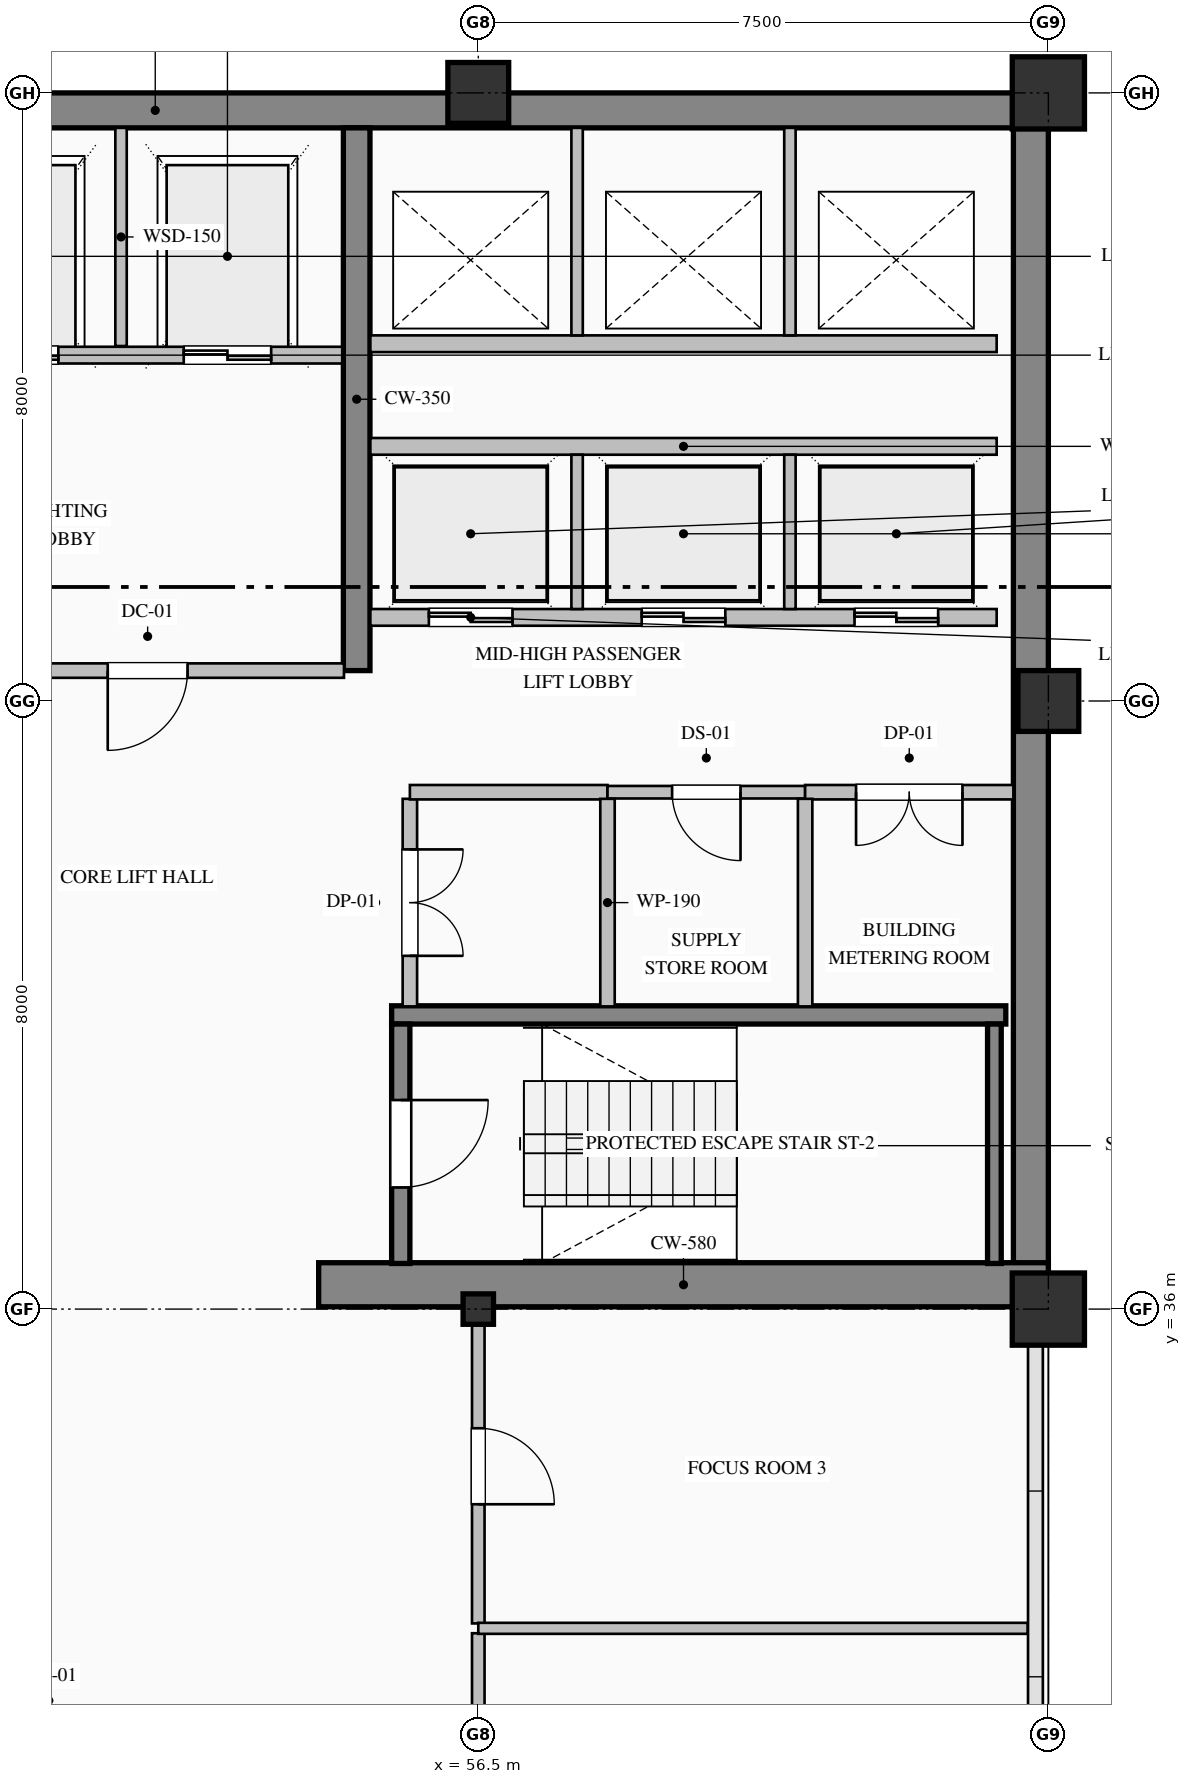
"""IFC4 building model, lengths in metres.
Left out: names, types, materials, properties, quantities, classifications, styles, units other than length and angle.
Written with IfcOpenShell. Run it as: python <this file> out.ifc"""

import sys

from ifc_helpers import new_model, si_unit, direction, frame, frame_2d, origin, origin_2d, place, context, subcontext, project, spatial, rectangle, hollow_rectangle, i_section, extrude, element, fill, save


model = new_model("IFC4")
c1 = context("Model", 3, precision=1e-05, world=origin(), true_north=direction((0.0, 1.0)))
c2 = subcontext(c1, "Body", "Model", "MODEL_VIEW")
j1 = project(units=[si_unit("LENGTHUNIT", "METRE"), si_unit("PLANEANGLEUNIT", "RADIAN")], contexts=[c1])
p1 = place(None, origin())
s1 = spatial("IfcSite", under=j1, at=p1, CompositionType="ELEMENT")
p2 = place(p1, origin())
s2 = spatial("IfcBuilding", under=s1, at=p2, CompositionType="ELEMENT")
p3 = place(p2, frame((0.0, 0.0, 209.8)))
s3 = spatial("IfcBuildingStorey", under=s2, at=p3, CompositionType="ELEMENT", Elevation=209.8)
p4 = place(p3, frame((40.5, 51.77, 0.0), z_axis=(0.0, 0.0, 1.0), x_axis=(1.0, 0.0, 0.0)))
e1 = element("IfcWall", 1, at=p4, inside=s3, PredefinedType="SHEAR", context=c2, shape_type="SweptSolid", body=[
    extrude(rectangle(XDim=23.5, YDim=0.46, at=frame_2d((11.75, 0.0))), origin(), (0.0, 0.0, 1.0), 3.775),
])
p5 = place(p3, frame((63.77, 36.32, 0.0), z_axis=(0.0, 0.0, 1.0), x_axis=(0.0, 1.0, 0.0)))
e2 = element("IfcWall", 2, at=p5, inside=s3, PredefinedType="SHEAR", context=c2, shape_type="SweptSolid", body=[
    extrude(rectangle(XDim=15.22, YDim=0.46, at=frame_2d((7.61, 0.0))), origin(), (0.0, 0.0, 1.0), 3.775),
])
p6 = place(p3, frame((54.4, 36.32, 0.0), z_axis=(0.0, 0.0, 1.0), x_axis=(1.0, 0.0, 0.0)))
e3 = element("IfcWall", 3, at=p6, inside=s3, PredefinedType="SHEAR", context=c2, shape_type="SweptSolid", body=[
    extrude(rectangle(XDim=9.6, YDim=0.58, at=frame_2d((4.8, 0.0))), origin(), (0.0, 0.0, 1.0), 4.0),
])
p7 = place(p3, frame((54.9, 44.4, 0.0), z_axis=(0.0, 0.0, 1.0), x_axis=(0.0, 1.0, 0.0)))
e4 = element("IfcWall", 4, at=p7, inside=s3, PredefinedType="SHEAR", context=c2, shape_type="SweptSolid", body=[
    extrude(rectangle(XDim=7.14, YDim=0.35, at=frame_2d((3.57, 0.0))), origin(), (0.0, 0.0, 1.0), 3.775),
])
p8 = place(p3, frame((56.5, 36.0, 0.0), z_axis=(0.0, 0.0, 1.0), x_axis=(1.0, 0.0, 0.0)))
e5 = element("IfcColumn", 5, at=p8, inside=s3, PredefinedType="COLUMN", context=c2, shape_type="SweptSolid", body=[
    extrude(i_section(OverallWidth=0.4, OverallDepth=0.4, WebThickness=0.013, FlangeThickness=0.021, FilletRadius=0.022, at=origin_2d()), origin(), (0.0, 0.0, 1.0), 4.0),
])
p9 = place(p3, frame((56.5, 52.0, 0.0), z_axis=(0.0, 0.0, 1.0), x_axis=(1.0, 0.0, 0.0)))
e6 = element("IfcColumn", 6, at=p9, inside=s3, PredefinedType="COLUMN", context=c2, shape_type="SweptSolid", body=[
    extrude(hollow_rectangle(XDim=0.8, YDim=0.8, WallThickness=0.032, at=origin_2d()), origin(), (0.0, 0.0, 1.0), 4.0),
])
p10 = place(p3, frame((64.0, 36.0, 0.0), z_axis=(0.0, 0.0, 1.0), x_axis=(1.0, 0.0, 0.0)))
e7 = element("IfcColumn", 7, at=p10, inside=s3, PredefinedType="COLUMN", context=c2, shape_type="SweptSolid", body=[
    extrude(hollow_rectangle(XDim=0.95, YDim=0.95, WallThickness=0.036, at=origin_2d()), origin(), (0.0, 0.0, 1.0), 4.0),
])
p11 = place(p3, frame((64.0, 44.0, 0.0), z_axis=(0.0, 0.0, 1.0), x_axis=(1.0, 0.0, 0.0)))
e8 = element("IfcColumn", 8, at=p11, inside=s3, PredefinedType="COLUMN", context=c2, shape_type="SweptSolid", body=[
    extrude(hollow_rectangle(XDim=0.8, YDim=0.8, WallThickness=0.032, at=origin_2d()), origin(), (0.0, 0.0, 1.0), 4.0),
])
p12 = place(p3, frame((64.0, 52.0, 0.0), z_axis=(0.0, 0.0, 1.0), x_axis=(1.0, 0.0, 0.0)))
e9 = element("IfcColumn", 9, at=p12, inside=s3, PredefinedType="COLUMN", context=c2, shape_type="SweptSolid", body=[
    extrude(hollow_rectangle(XDim=0.95, YDim=0.95, WallThickness=0.036, at=origin_2d()), origin(), (0.0, 0.0, 1.0), 4.0),
])
p13 = place(p3, frame((55.36, 39.87, 0.0), z_axis=(0.0, 0.0, 1.0), x_axis=(1.0, 0.0, 0.0)))
e10 = element("IfcWall", 10, at=p13, inside=s3, PredefinedType="SOLIDWALL", context=c2, shape_type="SweptSolid", body=[
    extrude(rectangle(XDim=8.08, YDim=0.24, at=frame_2d((4.04, 0.0))), origin(), (0.0, 0.0, 1.0), 4.0),
])
p14 = place(p3, frame((55.48, 39.75, 0.0), z_axis=(0.0, 0.0, 1.0), x_axis=(0.0, -1.0, 0.0)))
e11 = element("IfcWall", 11, at=p14, inside=s3, PredefinedType="SOLIDWALL", context=c2, shape_type="SweptSolid", body=[
    extrude(rectangle(XDim=3.15, YDim=0.24, at=frame_2d((1.575, 0.0))), origin(), (0.0, 0.0, 1.0), 4.0),
])
p15 = place(p14, frame((1.0, 0.0, 0.0)))
e12 = element("IfcOpeningElement", 12, at=p15, cuts=e11, PredefinedType="OPENING", context=c2, shape_type="SweptSolid", body=[
    extrude(rectangle(XDim=1.15, YDim=2.2, at=frame_2d((0.575, 1.1))), frame((0.0, 0.13, 0.0), z_axis=(0.0, -1.0, 0.0), x_axis=(1.0, 0.0, 0.0)), (0.0, 0.0, 1.0), 0.26),
])
p16 = place(p3, frame((63.29, 36.6, 0.0), z_axis=(0.0, 0.0, 1.0), x_axis=(0.0, 1.0, 0.0)))
e13 = element("IfcWall", 13, at=p16, inside=s3, PredefinedType="SOLIDWALL", context=c2, shape_type="SweptSolid", body=[
    extrude(rectangle(XDim=3.15, YDim=0.18, at=frame_2d((1.575, 0.0))), origin(), (0.0, 0.0, 1.0), 4.0),
])
p17 = place(p3, frame((54.71, 48.55, 0.0), z_axis=(0.0, 0.0, 1.0), x_axis=(-1.0, 0.0, 0.0)))
e14 = element("IfcWall", 14, at=p17, inside=s3, PredefinedType="PARTITIONING", context=c2, shape_type="SweptSolid", body=[
    extrude(rectangle(XDim=5.12, YDim=0.22, at=frame_2d((2.56, 0.0))), origin(), (0.0, 0.0, 1.0), 3.775),
])
p18 = place(p17, frame((3.735, 0.0, 0.0)))
e15 = element("IfcOpeningElement", 15, at=p18, cuts=e14, PredefinedType="OPENING", context=c2, shape_type="SweptSolid", body=[
    extrude(rectangle(XDim=1.15, YDim=2.2, at=frame_2d((0.575, 1.1))), frame((0.0, 0.12, 0.0), z_axis=(0.0, -1.0, 0.0), x_axis=(1.0, 0.0, 0.0)), (0.0, 0.0, 1.0), 0.24),
])
p19 = place(p17, frame((0.935, 0.0, 0.0)))
e16 = element("IfcOpeningElement", 16, at=p19, cuts=e14, PredefinedType="OPENING", context=c2, shape_type="SweptSolid", body=[
    extrude(rectangle(XDim=1.15, YDim=2.2, at=frame_2d((0.575, 1.1))), frame((0.0, 0.12, 0.0), z_axis=(0.0, -1.0, 0.0), x_axis=(1.0, 0.0, 0.0)), (0.0, 0.0, 1.0), 0.24),
])
p20 = place(p3, frame((51.8, 48.67, 0.0), z_axis=(0.0, 0.0, 1.0), x_axis=(0.0, 1.0, 0.0)))
e17 = element("IfcWall", 17, at=p20, inside=s3, PredefinedType="PARTITIONING", context=c2, shape_type="SweptSolid", body=[
    extrude(rectangle(XDim=2.87, YDim=0.15, at=frame_2d((1.435, 0.0))), origin(), (0.0, 0.0, 1.0), 3.775),
])
p21 = place(p3, frame((63.32, 45.1, 0.0), z_axis=(0.0, 0.0, 1.0), x_axis=(-1.0, 0.0, 0.0)))
e18 = element("IfcWall", 18, at=p21, inside=s3, PredefinedType="PARTITIONING", context=c2, shape_type="SweptSolid", body=[
    extrude(rectangle(XDim=8.24, YDim=0.22, at=frame_2d((4.12, 0.0))), origin(), (0.0, 0.0, 1.0), 3.775),
])
p22 = place(p21, frame((6.37, 0.0, 0.0)))
e19 = element("IfcOpeningElement", 19, at=p22, cuts=e18, PredefinedType="OPENING", context=c2, shape_type="SweptSolid", body=[
    extrude(rectangle(XDim=1.1, YDim=2.2, at=frame_2d((0.55, 1.1))), frame((0.0, 0.12, 0.0), z_axis=(0.0, -1.0, 0.0), x_axis=(1.0, 0.0, 0.0)), (0.0, 0.0, 1.0), 0.24),
])
p23 = place(p21, frame((3.57, 0.0, 0.0)))
e20 = element("IfcOpeningElement", 20, at=p23, cuts=e18, PredefinedType="OPENING", context=c2, shape_type="SweptSolid", body=[
    extrude(rectangle(XDim=1.1, YDim=2.2, at=frame_2d((0.55, 1.1))), frame((0.0, 0.12, 0.0), z_axis=(0.0, -1.0, 0.0), x_axis=(1.0, 0.0, 0.0)), (0.0, 0.0, 1.0), 0.24),
])
p24 = place(p21, frame((0.77, 0.0, 0.0)))
e21 = element("IfcOpeningElement", 21, at=p24, cuts=e18, PredefinedType="OPENING", context=c2, shape_type="SweptSolid", body=[
    extrude(rectangle(XDim=1.1, YDim=2.2, at=frame_2d((0.55, 1.1))), frame((0.0, 0.12, 0.0), z_axis=(0.0, -1.0, 0.0), x_axis=(1.0, 0.0, 0.0)), (0.0, 0.0, 1.0), 0.24),
])
p25 = place(p3, frame((55.08, 47.35, 0.0), z_axis=(0.0, 0.0, 1.0), x_axis=(1.0, 0.0, 0.0)))
e22 = element("IfcWall", 22, at=p25, inside=s3, PredefinedType="PARTITIONING", context=c2, shape_type="SweptSolid", body=[
    extrude(rectangle(XDim=8.24, YDim=0.22, at=frame_2d((4.12, 0.0))), origin(), (0.0, 0.0, 1.0), 3.775),
])
for number, where, z_axis, x_axis in (
    (23, (57.8, 45.21, 0.0), (0.0, 0.0, 1.0), (0.0, 1.0, 0.0)),
    (24, (60.6, 45.21, 0.0), (0.0, 0.0, 1.0), (0.0, 1.0, 0.0)),
):
    element("IfcWall", number, at=place(p3, frame(where, z_axis=z_axis, x_axis=x_axis)), inside=s3, PredefinedType="PARTITIONING", context=c2, shape_type="SweptSolid", body=[
        extrude(rectangle(XDim=2.03, YDim=0.15, at=frame_2d((1.015, 0.0))), origin(), (0.0, 0.0, 1.0), 3.775),
    ])
p26 = place(p3, frame((63.32, 48.7, 0.0), z_axis=(0.0, 0.0, 1.0), x_axis=(-1.0, 0.0, 0.0)))
e25 = element("IfcWall", 25, at=p26, inside=s3, PredefinedType="PARTITIONING", context=c2, shape_type="SweptSolid", body=[
    extrude(rectangle(XDim=8.24, YDim=0.22, at=frame_2d((4.12, 0.0))), origin(), (0.0, 0.0, 1.0), 3.775),
])
for number, where, z_axis, x_axis in (
    (26, (57.8, 48.81, 0.0), (0.0, 0.0, 1.0), (0.0, 1.0, 0.0)),
    (27, (60.6, 48.81, 0.0), (0.0, 0.0, 1.0), (0.0, 1.0, 0.0)),
):
    element("IfcWall", number, at=place(p3, frame(where, z_axis=z_axis, x_axis=x_axis)), inside=s3, PredefinedType="PARTITIONING", context=c2, shape_type="SweptSolid", body=[
        extrude(rectangle(XDim=2.73, YDim=0.15, at=frame_2d((1.365, 0.0))), origin(), (0.0, 0.0, 1.0), 3.775),
    ])
p27 = place(p3, frame((54.733, 44.4, 0.0), z_axis=(0.0, 0.0, 1.0), x_axis=(-1.0, 0.0, 0.0)))
e28 = element("IfcWall", 28, at=p27, inside=s3, PredefinedType="PARTITIONING", context=c2, shape_type="SweptSolid", body=[
    extrude(rectangle(XDim=5.166, YDim=0.19, at=frame_2d((2.583, 0.0))), origin(), (0.0, 0.0, 1.0), 3.775),
])
p28 = place(p27, frame((2.058, 0.0, 0.0)))
e29 = element("IfcOpeningElement", 29, at=p28, cuts=e28, PredefinedType="OPENING", context=c2, shape_type="SweptSolid", body=[
    extrude(rectangle(XDim=1.05, YDim=2.15, at=frame_2d((0.525, 1.075))), frame((0.0, 0.105, 0.0), z_axis=(0.0, -1.0, 0.0), x_axis=(1.0, 0.0, 0.0)), (0.0, 0.0, 1.0), 0.21),
])
p29 = place(p3, frame((55.6, 42.713, 0.0), z_axis=(0.0, 0.0, 1.0), x_axis=(0.0, -1.0, 0.0)))
e30 = element("IfcWall", 30, at=p29, inside=s3, PredefinedType="PARTITIONING", context=c2, shape_type="SweptSolid", body=[
    extrude(rectangle(XDim=2.731, YDim=0.19, at=frame_2d((1.365, 0.0))), origin(), (0.0, 0.0, 1.0), 3.775),
])
p30 = place(p29, frame((0.666, 0.0, 0.0)))
e31 = element("IfcOpeningElement", 31, at=p30, cuts=e30, PredefinedType="OPENING", context=c2, shape_type="SweptSolid", body=[
    extrude(rectangle(XDim=1.4, YDim=2.25, at=frame_2d((0.7, 1.125))), frame((0.0, 0.105, 0.0), z_axis=(0.0, -1.0, 0.0), x_axis=(1.0, 0.0, 0.0)), (0.0, 0.0, 1.0), 0.21),
])
p31 = place(p3, frame((58.2, 42.8, 0.0), z_axis=(0.0, 0.0, 1.0), x_axis=(-1.0, 0.0, 0.0)))
e32 = element("IfcWall", 32, at=p31, inside=s3, PredefinedType="PARTITIONING", context=c2, shape_type="SweptSolid", body=[
    extrude(rectangle(XDim=2.6, YDim=0.19, at=frame_2d((1.3, 0.0))), origin(), (0.0, 0.0, 1.0), 3.775),
])
p32 = place(p3, frame((60.8, 42.8, 0.0), z_axis=(0.0, 0.0, 1.0), x_axis=(-1.0, 0.0, 0.0)))
e33 = element("IfcWall", 33, at=p32, inside=s3, PredefinedType="PARTITIONING", context=c2, shape_type="SweptSolid", body=[
    extrude(rectangle(XDim=2.6, YDim=0.165, at=frame_2d((1.3, 0.0))), origin(), (0.0, 0.0, 1.0), 3.775),
])
p33 = place(p32, frame((0.85, 0.0, 0.0)))
e34 = element("IfcOpeningElement", 34, at=p33, cuts=e33, PredefinedType="OPENING", context=c2, shape_type="SweptSolid", body=[
    extrude(rectangle(XDim=0.9, YDim=2.15, at=frame_2d((0.45, 1.075))), frame((0.0, 0.093, 0.0), z_axis=(0.0, -1.0, 0.0), x_axis=(1.0, 0.0, 0.0)), (0.0, 0.0, 1.0), 0.185),
])
p34 = place(p3, frame((63.54, 42.8, 0.0), z_axis=(0.0, 0.0, 1.0), x_axis=(-1.0, 0.0, 0.0)))
e35 = element("IfcWall", 35, at=p34, inside=s3, PredefinedType="PARTITIONING", context=c2, shape_type="SweptSolid", body=[
    extrude(rectangle(XDim=2.74, YDim=0.19, at=frame_2d((1.37, 0.0))), origin(), (0.0, 0.0, 1.0), 3.775),
])
p35 = place(p34, frame((0.67, 0.0, 0.0)))
e36 = element("IfcOpeningElement", 36, at=p35, cuts=e35, PredefinedType="OPENING", context=c2, shape_type="SweptSolid", body=[
    extrude(rectangle(XDim=1.4, YDim=2.25, at=frame_2d((0.7, 1.125))), frame((0.0, 0.105, 0.0), z_axis=(0.0, -1.0, 0.0), x_axis=(1.0, 0.0, 0.0)), (0.0, 0.0, 1.0), 0.21),
])
for number, where, z_axis, x_axis in (
    (37, (58.2, 42.713, 0.0), (0.0, 0.0, 1.0), (0.0, -1.0, 0.0)),
    (38, (60.8, 42.713, 0.0), (0.0, 0.0, 1.0), (0.0, -1.0, 0.0)),
):
    element("IfcWall", number, at=place(p3, frame(where, z_axis=z_axis, x_axis=x_axis)), inside=s3, PredefinedType="PARTITIONING", context=c2, shape_type="SweptSolid", body=[
        extrude(rectangle(XDim=2.731, YDim=0.19, at=frame_2d((1.365, 0.0))), origin(), (0.0, 0.0, 1.0), 3.775),
    ])
p36 = place(p3, frame((56.5, 31.736, 0.0), z_axis=(0.0, 0.0, 1.0), x_axis=(0.0, -1.0, 0.0)))
e39 = element("IfcWall", 39, at=p36, inside=s3, PredefinedType="PARTITIONING", context=c2, shape_type="SweptSolid", body=[
    extrude(rectangle(XDim=1.261, YDim=0.165, at=frame_2d((0.63, 0.0))), origin(), (0.0, 0.0, 1.0), 3.179),
])
p37 = place(p3, frame((56.5, 36.0, 0.0), z_axis=(0.0, 0.0, 1.0), x_axis=(0.0, -1.0, 0.0)))
e40 = element("IfcWall", 40, at=p37, inside=s3, PredefinedType="PARTITIONING", context=c2, shape_type="SweptSolid", body=[
    extrude(rectangle(XDim=4.135, YDim=0.165, at=frame_2d((2.068, 0.0))), origin(), (0.0, 0.0, 1.0), 3.179),
])
p38 = place(p37, frame((1.568, 0.0, 0.0)))
e41 = element("IfcOpeningElement", 41, at=p38, cuts=e40, PredefinedType="OPENING", context=c2, shape_type="SweptSolid", body=[
    extrude(rectangle(XDim=1.0, YDim=2.15, at=frame_2d((0.5, 1.075))), frame((0.0, 0.093, 0.0), z_axis=(0.0, -1.0, 0.0), x_axis=(1.0, 0.0, 0.0)), (0.0, 0.0, 1.0), 0.185),
])
p39 = place(p3, frame((56.5, 31.8, 0.0), z_axis=(0.0, 0.0, 1.0), x_axis=(1.0, 0.0, 0.0)))
e42 = element("IfcWall", 42, at=p39, inside=s3, PredefinedType="PARTITIONING", context=c2, shape_type="SweptSolid", body=[
    extrude(rectangle(XDim=7.228, YDim=0.145, at=frame_2d((3.614, 0.0))), origin(), (0.0, 0.0, 1.0), 3.775),
])
p40 = place(p15, origin())
e43 = element("IfcDoor", 43, at=p40, inside=s3, OperationType="SINGLE_SWING_LEFT", PredefinedType="DOOR", context=c2, shape_type="SweptSolid", body=[
    extrude(rectangle(XDim=1.15, YDim=2.2, at=frame_2d((0.575, 1.1))), frame((0.0, 0.025, 0.0), z_axis=(0.0, -1.0, 0.0), x_axis=(1.0, 0.0, 0.0)), (0.0, 0.0, 1.0), 0.05),
])
fill(e12, e43)
p41 = place(p18, origin())
e44 = element("IfcDoor", 44, at=p41, inside=s3, OperationType="DOUBLE_DOOR_SLIDING", PredefinedType="DOOR", context=c2, shape_type="SweptSolid", body=[
    extrude(rectangle(XDim=1.15, YDim=2.2, at=frame_2d((0.575, 1.1))), frame((0.0, 0.025, 0.0), z_axis=(0.0, -1.0, 0.0), x_axis=(1.0, 0.0, 0.0)), (0.0, 0.0, 1.0), 0.05),
])
fill(e15, e44)
p42 = place(p19, origin())
e45 = element("IfcDoor", 45, at=p42, inside=s3, OperationType="DOUBLE_DOOR_SLIDING", PredefinedType="DOOR", context=c2, shape_type="SweptSolid", body=[
    extrude(rectangle(XDim=1.15, YDim=2.2, at=frame_2d((0.575, 1.1))), frame((0.0, 0.025, 0.0), z_axis=(0.0, -1.0, 0.0), x_axis=(1.0, 0.0, 0.0)), (0.0, 0.0, 1.0), 0.05),
])
fill(e16, e45)
p43 = place(p22, origin())
e46 = element("IfcDoor", 46, at=p43, inside=s3, OperationType="DOUBLE_DOOR_SLIDING", PredefinedType="DOOR", context=c2, shape_type="SweptSolid", body=[
    extrude(rectangle(XDim=1.1, YDim=2.2, at=frame_2d((0.55, 1.1))), frame((0.0, 0.025, 0.0), z_axis=(0.0, -1.0, 0.0), x_axis=(1.0, 0.0, 0.0)), (0.0, 0.0, 1.0), 0.05),
])
fill(e19, e46)
p44 = place(p23, origin())
e47 = element("IfcDoor", 47, at=p44, inside=s3, OperationType="DOUBLE_DOOR_SLIDING", PredefinedType="DOOR", context=c2, shape_type="SweptSolid", body=[
    extrude(rectangle(XDim=1.1, YDim=2.2, at=frame_2d((0.55, 1.1))), frame((0.0, 0.025, 0.0), z_axis=(0.0, -1.0, 0.0), x_axis=(1.0, 0.0, 0.0)), (0.0, 0.0, 1.0), 0.05),
])
fill(e20, e47)
p45 = place(p24, origin())
e48 = element("IfcDoor", 48, at=p45, inside=s3, OperationType="DOUBLE_DOOR_SLIDING", PredefinedType="DOOR", context=c2, shape_type="SweptSolid", body=[
    extrude(rectangle(XDim=1.1, YDim=2.2, at=frame_2d((0.55, 1.1))), frame((0.0, 0.025, 0.0), z_axis=(0.0, -1.0, 0.0), x_axis=(1.0, 0.0, 0.0)), (0.0, 0.0, 1.0), 0.05),
])
fill(e21, e48)
p46 = place(p28, origin())
e49 = element("IfcDoor", 49, at=p46, inside=s3, OperationType="SINGLE_SWING_RIGHT", PredefinedType="DOOR", context=c2, shape_type="SweptSolid", body=[
    extrude(rectangle(XDim=1.05, YDim=2.15, at=frame_2d((0.525, 1.075))), frame((0.0, 0.025, 0.0), z_axis=(0.0, -1.0, 0.0), x_axis=(1.0, 0.0, 0.0)), (0.0, 0.0, 1.0), 0.05),
])
fill(e29, e49)
p47 = place(p30, origin())
e50 = element("IfcDoor", 50, at=p47, inside=s3, OperationType="DOUBLE_DOOR_SINGLE_SWING", PredefinedType="DOOR", context=c2, shape_type="SweptSolid", body=[
    extrude(rectangle(XDim=1.4, YDim=2.25, at=frame_2d((0.7, 1.125))), frame((0.0, 0.025, 0.0), z_axis=(0.0, -1.0, 0.0), x_axis=(1.0, 0.0, 0.0)), (0.0, 0.0, 1.0), 0.05),
])
fill(e31, e50)
p48 = place(p33, origin())
e51 = element("IfcDoor", 51, at=p48, inside=s3, OperationType="SINGLE_SWING_LEFT", PredefinedType="DOOR", context=c2, shape_type="SweptSolid", body=[
    extrude(rectangle(XDim=0.9, YDim=2.15, at=frame_2d((0.45, 1.075))), frame((0.0, 0.025, 0.0), z_axis=(0.0, -1.0, 0.0), x_axis=(1.0, 0.0, 0.0)), (0.0, 0.0, 1.0), 0.05),
])
fill(e34, e51)
p49 = place(p35, origin())
e52 = element("IfcDoor", 52, at=p49, inside=s3, OperationType="DOUBLE_DOOR_SINGLE_SWING", PredefinedType="DOOR", context=c2, shape_type="SweptSolid", body=[
    extrude(rectangle(XDim=1.4, YDim=2.25, at=frame_2d((0.7, 1.125))), frame((0.0, 0.025, 0.0), z_axis=(0.0, -1.0, 0.0), x_axis=(1.0, 0.0, 0.0)), (0.0, 0.0, 1.0), 0.05),
])
fill(e36, e52)
p50 = place(p38, origin())
e53 = element("IfcDoor", 53, at=p50, inside=s3, OperationType="SINGLE_SWING_RIGHT", PredefinedType="DOOR", context=c2, shape_type="SweptSolid", body=[
    extrude(rectangle(XDim=1.0, YDim=2.15, at=frame_2d((0.5, 1.075))), frame((0.0, 0.025, 0.0), z_axis=(0.0, -1.0, 0.0), x_axis=(1.0, 0.0, 0.0)), (0.0, 0.0, 1.0), 0.05),
])
fill(e41, e53)
save(model, sys.argv[1])
